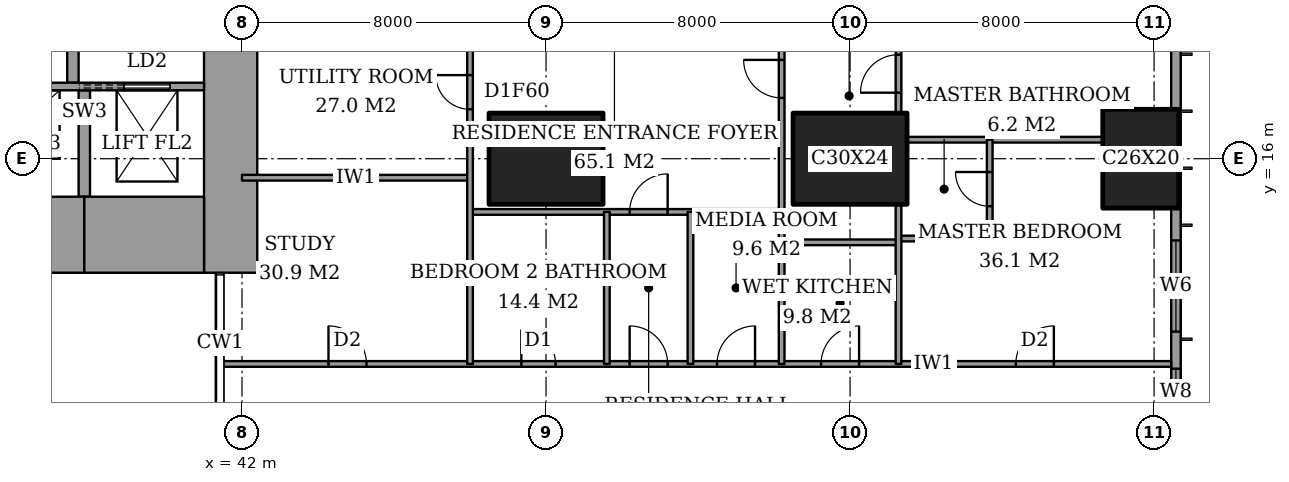
"""IFC4 building model, lengths in metres.
Left out: names, types, materials, properties, quantities, classifications, styles, units other than length and angle.
Written with IfcOpenShell. Run it as: python <this file> out.ifc"""

import sys

from ifc_helpers import new_model, si_unit, direction, frame, frame_2d, origin, origin_2d, place, context, subcontext, project, spatial, rectangle, extrude, element, fill, save


model = new_model("IFC4")
c1 = context("Model", 3, precision=1e-05, world=origin(), true_north=direction((0.0, 1.0)))
c2 = subcontext(c1, "Body", "Model", "MODEL_VIEW")
j1 = project(units=[si_unit("LENGTHUNIT", "METRE"), si_unit("PLANEANGLEUNIT", "RADIAN")], contexts=[c1])
p1 = place(None, origin())
s1 = spatial("IfcSite", under=j1, at=p1, CompositionType="ELEMENT")
p2 = place(p1, origin())
s2 = spatial("IfcBuilding", under=s1, at=p2, CompositionType="ELEMENT")
p3 = place(p2, frame((0.0, 0.0, 44.0)))
s3 = spatial("IfcBuildingStorey", under=s2, at=p3, CompositionType="ELEMENT", Elevation=44.0)
for number, where, z_axis, x_axis in (
    (1, (50.0, 16.0, 0.0), (0.0, 0.0, 1.0), (1.0, 0.0, 0.0)),
    (2, (58.0, 16.0, 0.0), (0.0, 0.0, 1.0), (1.0, 0.0, 0.0)),
):
    element("IfcColumn", number, at=place(p3, frame(where, z_axis=z_axis, x_axis=x_axis)), inside=s3, PredefinedType="COLUMN", context=c2, shape_type="SweptSolid", body=[
        extrude(rectangle(XDim=3.0, YDim=2.4, at=origin_2d()), origin(), (0.0, 0.0, 1.0), 3.6),
    ])
p4 = place(p3, frame((65.65, 16.0, 0.0), z_axis=(0.0, 0.0, 1.0), x_axis=(0.0, 1.0, 0.0)))
e3 = element("IfcColumn", 3, at=p4, inside=s3, PredefinedType="COLUMN", context=c2, shape_type="SweptSolid", body=[
    extrude(rectangle(XDim=2.6, YDim=2.0, at=origin_2d()), origin(), (0.0, 0.0, 1.0), 3.6),
])
p5 = place(p3, frame((28.15, 14.0, 0.0), z_axis=(0.0, 0.0, 1.0), x_axis=(1.0, 0.0, 0.0)))
e4 = element("IfcWall", 4, at=p5, inside=s3, PredefinedType="SHEAR", context=c2, shape_type="SweptSolid", body=[
    extrude(rectangle(XDim=9.7, YDim=2.0, at=frame_2d((4.85, 0.0))), origin(), (0.0, 0.0, 1.0), 3.6),
])
p6 = place(p3, frame((37.85, 14.0, 0.0), z_axis=(0.0, 0.0, 1.0), x_axis=(1.0, 0.0, 0.0)))
e5 = element("IfcWall", 5, at=p6, inside=s3, PredefinedType="SHEAR", context=c2, shape_type="SweptSolid", body=[
    extrude(rectangle(XDim=3.15, YDim=2.0, at=frame_2d((1.575, 0.0))), origin(), (0.0, 0.0, 1.0), 3.6),
])
p7 = place(p3, frame((41.7, 13.0, 0.0), z_axis=(0.0, 0.0, 1.0), x_axis=(0.0, 1.0, 0.0)))
e6 = element("IfcWall", 6, at=p7, inside=s3, PredefinedType="SHEAR", context=c2, shape_type="SweptSolid", body=[
    extrude(rectangle(XDim=11.85, YDim=1.4, at=frame_2d((5.925, 0.0))), origin(), (0.0, 0.0, 1.0), 3.6),
])
p8 = place(p7, frame((7.5, 0.0, 0.0)))
e7 = element("IfcOpeningElement", 7, at=p8, cuts=e6, PredefinedType="OPENING", context=c2, shape_type="SweptSolid", body=[
    extrude(rectangle(XDim=1.8, YDim=2.4, at=frame_2d((0.9, 1.2))), frame((0.0, 0.71, 0.0), z_axis=(0.0, -1.0, 0.0), x_axis=(1.0, 0.0, 0.0)), (0.0, 0.0, 1.0), 1.42),
])
p9 = place(p3, frame((37.55, 18.0, 0.0), z_axis=(0.0, 0.0, 1.0), x_axis=(0.0, 1.0, 0.0)))
e8 = element("IfcWall", 8, at=p9, inside=s3, PredefinedType="PARTITIONING", context=c2, shape_type="SweptSolid", body=[
    extrude(rectangle(XDim=6.7, YDim=0.3, at=frame_2d((3.35, 0.0))), origin(), (0.0, 0.0, 1.0), 3.6),
])
p10 = place(p9, frame((2.8, 0.0, 0.0)))
e9 = element("IfcOpeningElement", 9, at=p10, cuts=e8, PredefinedType="OPENING", context=c2, shape_type="SweptSolid", body=[
    extrude(rectangle(XDim=1.2, YDim=2.1, at=frame_2d((0.6, 1.05))), frame((0.0, 0.16, 0.0), z_axis=(0.0, -1.0, 0.0), x_axis=(1.0, 0.0, 0.0)), (0.0, 0.0, 1.0), 0.32),
])
p11 = place(p3, frame((66.575, 3.175, 0.0), z_axis=(0.0, 0.0, 1.0), x_axis=(0.0, 1.0, 0.0)))
e10 = element("IfcWall", 10, at=p11, inside=s3, PredefinedType="SOLIDWALL", context=c2, shape_type="SweptSolid", body=[
    extrude(rectangle(XDim=41.65, YDim=0.25, at=frame_2d((20.825, 0.0))), origin(), (0.0, 0.0, 1.0), 3.6),
])
p12 = place(p11, frame((0.775, 0.0, 0.6)))
e11 = element("IfcOpeningElement", 11, at=p12, cuts=e10, PredefinedType="OPENING", context=c2, shape_type="SweptSolid", body=[
    extrude(rectangle(XDim=2.4, YDim=2.0, at=frame_2d((1.2, 1.0))), frame((0.0, 0.135, 0.0), z_axis=(0.0, -1.0, 0.0), x_axis=(1.0, 0.0, 0.0)), (0.0, 0.0, 1.0), 0.27),
])
p13 = place(p11, frame((6.1, 0.0, 0.6)))
e12 = element("IfcOpeningElement", 12, at=p13, cuts=e10, PredefinedType="OPENING", context=c2, shape_type="SweptSolid", body=[
    extrude(rectangle(XDim=1.2, YDim=2.0, at=frame_2d((0.6, 1.0))), frame((0.0, 0.135, 0.0), z_axis=(0.0, -1.0, 0.0), x_axis=(1.0, 0.0, 0.0)), (0.0, 0.0, 1.0), 0.27),
])
p14 = place(p11, frame((8.275, 0.0, 0.6)))
e13 = element("IfcOpeningElement", 13, at=p14, cuts=e10, PredefinedType="OPENING", context=c2, shape_type="SweptSolid", body=[
    extrude(rectangle(XDim=2.4, YDim=2.0, at=frame_2d((1.2, 1.0))), frame((0.0, 0.135, 0.0), z_axis=(0.0, -1.0, 0.0), x_axis=(1.0, 0.0, 0.0)), (0.0, 0.0, 1.0), 0.27),
])
p15 = place(p11, frame((15.775, 0.0, 0.6)))
e14 = element("IfcOpeningElement", 14, at=p15, cuts=e10, PredefinedType="OPENING", context=c2, shape_type="SweptSolid", body=[
    extrude(rectangle(XDim=2.4, YDim=2.0, at=frame_2d((1.2, 1.0))), frame((0.0, 0.135, 0.0), z_axis=(0.0, -1.0, 0.0), x_axis=(1.0, 0.0, 0.0)), (0.0, 0.0, 1.0), 0.27),
])
p16 = place(p11, frame((23.475, 0.0, 0.6)))
e15 = element("IfcOpeningElement", 15, at=p16, cuts=e10, PredefinedType="OPENING", context=c2, shape_type="SweptSolid", body=[
    extrude(rectangle(XDim=2.4, YDim=2.0, at=frame_2d((1.2, 1.0))), frame((0.0, 0.135, 0.0), z_axis=(0.0, -1.0, 0.0), x_axis=(1.0, 0.0, 0.0)), (0.0, 0.0, 1.0), 0.27),
])
p17 = place(p11, frame((30.975, 0.0, 0.6)))
e16 = element("IfcOpeningElement", 16, at=p17, cuts=e10, PredefinedType="OPENING", context=c2, shape_type="SweptSolid", body=[
    extrude(rectangle(XDim=2.4, YDim=2.0, at=frame_2d((1.2, 1.0))), frame((0.0, 0.135, 0.0), z_axis=(0.0, -1.0, 0.0), x_axis=(1.0, 0.0, 0.0)), (0.0, 0.0, 1.0), 0.27),
])
p18 = place(p11, frame((34.5, 0.0, 0.6)))
e17 = element("IfcOpeningElement", 17, at=p18, cuts=e10, PredefinedType="OPENING", context=c2, shape_type="SweptSolid", body=[
    extrude(rectangle(XDim=1.2, YDim=2.0, at=frame_2d((0.6, 1.0))), frame((0.0, 0.135, 0.0), z_axis=(0.0, -1.0, 0.0), x_axis=(1.0, 0.0, 0.0)), (0.0, 0.0, 1.0), 0.27),
])
p19 = place(p11, frame((38.475, 0.0, 0.6)))
e18 = element("IfcOpeningElement", 18, at=p19, cuts=e10, PredefinedType="OPENING", context=c2, shape_type="SweptSolid", body=[
    extrude(rectangle(XDim=2.4, YDim=2.0, at=frame_2d((1.2, 1.0))), frame((0.0, 0.135, 0.0), z_axis=(0.0, -1.0, 0.0), x_axis=(1.0, 0.0, 0.0)), (0.0, 0.0, 1.0), 0.27),
])
p20 = place(p3, frame((41.439, 10.6, 0.0), z_axis=(0.0, 0.0, 1.0), x_axis=(1.0, 0.0, 0.0)))
e19 = element("IfcWall", 19, at=p20, inside=s3, PredefinedType="PARTITIONING", context=c2, shape_type="SweptSolid", body=[
    extrude(rectangle(XDim=25.011, YDim=0.15, at=frame_2d((12.505, 0.0))), origin(), (0.0, 0.0, 1.0), 3.35),
])
p21 = place(p20, frame((10.761, 0.0, 0.0)))
e20 = element("IfcOpeningElement", 20, at=p21, cuts=e19, PredefinedType="OPENING", context=c2, shape_type="SweptSolid", body=[
    extrude(rectangle(XDim=1.0, YDim=2.1, at=frame_2d((0.5, 1.05))), frame((0.0, 0.085, 0.0), z_axis=(0.0, -1.0, 0.0), x_axis=(1.0, 0.0, 0.0)), (0.0, 0.0, 1.0), 0.17),
])
p22 = place(p20, frame((20.924, 0.0, 0.0)))
e21 = element("IfcOpeningElement", 21, at=p22, cuts=e19, PredefinedType="OPENING", context=c2, shape_type="SweptSolid", body=[
    extrude(rectangle(XDim=1.0, YDim=2.1, at=frame_2d((0.5, 1.05))), frame((0.0, 0.085, 0.0), z_axis=(0.0, -1.0, 0.0), x_axis=(1.0, 0.0, 0.0)), (0.0, 0.0, 1.0), 0.17),
])
p23 = place(p20, frame((15.799, 0.0, 0.0)))
e22 = element("IfcOpeningElement", 22, at=p23, cuts=e19, PredefinedType="OPENING", context=c2, shape_type="SweptSolid", body=[
    extrude(rectangle(XDim=1.0, YDim=2.1, at=frame_2d((0.5, 1.05))), frame((0.0, 0.085, 0.0), z_axis=(0.0, -1.0, 0.0), x_axis=(1.0, 0.0, 0.0)), (0.0, 0.0, 1.0), 0.17),
])
p24 = place(p20, frame((13.061, 0.0, 0.0)))
e23 = element("IfcOpeningElement", 23, at=p24, cuts=e19, PredefinedType="OPENING", context=c2, shape_type="SweptSolid", body=[
    extrude(rectangle(XDim=1.0, YDim=2.1, at=frame_2d((0.5, 1.05))), frame((0.0, 0.085, 0.0), z_axis=(0.0, -1.0, 0.0), x_axis=(1.0, 0.0, 0.0)), (0.0, 0.0, 1.0), 0.17),
])
p25 = place(p20, frame((7.911, 0.0, 0.0)))
e24 = element("IfcOpeningElement", 24, at=p25, cuts=e19, PredefinedType="OPENING", context=c2, shape_type="SweptSolid", body=[
    extrude(rectangle(XDim=0.9, YDim=2.1, at=frame_2d((0.45, 1.05))), frame((0.0, 0.085, 0.0), z_axis=(0.0, -1.0, 0.0), x_axis=(1.0, 0.0, 0.0)), (0.0, 0.0, 1.0), 0.17),
])
p26 = place(p20, frame((2.836, 0.0, 0.0)))
e25 = element("IfcOpeningElement", 25, at=p26, cuts=e19, PredefinedType="OPENING", context=c2, shape_type="SweptSolid", body=[
    extrude(rectangle(XDim=1.0, YDim=2.1, at=frame_2d((0.5, 1.05))), frame((0.0, 0.085, 0.0), z_axis=(0.0, -1.0, 0.0), x_axis=(1.0, 0.0, 0.0)), (0.0, 0.0, 1.0), 0.17),
])
p27 = place(p3, frame((56.2, 13.8, 0.0), z_axis=(0.0, 0.0, 1.0), x_axis=(1.0, 0.0, 0.0)))
e26 = element("IfcWall", 26, at=p27, inside=s3, PredefinedType="PARTITIONING", context=c2, shape_type="SweptSolid", body=[
    extrude(rectangle(XDim=3.075, YDim=0.15, at=frame_2d((1.538, 0.0))), origin(), (0.0, 0.0, 1.0), 3.35),
])
p28 = place(p3, frame((59.275, 13.9, 0.0), z_axis=(0.0, 0.0, 1.0), x_axis=(1.0, 0.0, 0.0)))
e27 = element("IfcWall", 27, at=p28, inside=s3, PredefinedType="PARTITIONING", context=c2, shape_type="SweptSolid", body=[
    extrude(rectangle(XDim=2.4, YDim=0.15, at=frame_2d((1.2, 0.0))), origin(), (0.0, 0.0, 1.0), 3.35),
])
p29 = place(p3, frame((48.0, 14.6, 0.0), z_axis=(0.0, 0.0, 1.0), x_axis=(1.0, 0.0, 0.0)))
e28 = element("IfcWall", 28, at=p29, inside=s3, PredefinedType="PARTITIONING", context=c2, shape_type="SweptSolid", body=[
    extrude(rectangle(XDim=8.2, YDim=0.15, at=frame_2d((4.1, 0.0))), origin(), (0.0, 0.0, 1.0), 3.35),
])
p30 = place(p29, frame((4.2, 0.0, 0.0)))
e29 = element("IfcOpeningElement", 29, at=p30, cuts=e28, PredefinedType="OPENING", context=c2, shape_type="SweptSolid", body=[
    extrude(rectangle(XDim=1.0, YDim=2.1, at=frame_2d((0.5, 1.05))), frame((0.0, 0.085, 0.0), z_axis=(0.0, -1.0, 0.0), x_axis=(1.0, 0.0, 0.0)), (0.0, 0.0, 1.0), 0.17),
])
p31 = place(p3, frame((42.0, 15.5, 0.0), z_axis=(0.0, 0.0, 1.0), x_axis=(1.0, 0.0, 0.0)))
e30 = element("IfcWall", 30, at=p31, inside=s3, PredefinedType="PARTITIONING", context=c2, shape_type="SweptSolid", body=[
    extrude(rectangle(XDim=6.0, YDim=0.15, at=frame_2d((3.0, 0.0))), origin(), (0.0, 0.0, 1.0), 3.35),
])
p32 = place(p3, frame((59.5, 16.5, 0.0), z_axis=(0.0, 0.0, 1.0), x_axis=(1.0, 0.0, 0.0)))
e31 = element("IfcWall", 31, at=p32, inside=s3, PredefinedType="PARTITIONING", context=c2, shape_type="SweptSolid", body=[
    extrude(rectangle(XDim=5.15, YDim=0.15, at=frame_2d((2.575, 0.0))), origin(), (0.0, 0.0, 1.0), 3.35),
])
p33 = place(p3, frame((48.0, 10.6, 0.0), z_axis=(0.0, 0.0, 1.0), x_axis=(0.0, 1.0, 0.0)))
e32 = element("IfcWall", 32, at=p33, inside=s3, PredefinedType="PARTITIONING", context=c2, shape_type="SweptSolid", body=[
    extrude(rectangle(XDim=13.4, YDim=0.15, at=frame_2d((6.7, 0.0))), origin(), (0.0, 0.0, 1.0), 3.35),
])
p34 = place(p33, frame((10.8, 0.0, 0.0)))
e33 = element("IfcOpeningElement", 33, at=p34, cuts=e32, PredefinedType="OPENING", context=c2, shape_type="SweptSolid", body=[
    extrude(rectangle(XDim=1.2, YDim=2.4, at=frame_2d((0.6, 1.2))), frame((0.0, 0.085, 0.0), z_axis=(0.0, -1.0, 0.0), x_axis=(1.0, 0.0, 0.0)), (0.0, 0.0, 1.0), 0.17),
])
p35 = place(p33, frame((6.7, 0.0, 0.0)))
e34 = element("IfcOpeningElement", 34, at=p35, cuts=e32, PredefinedType="OPENING", context=c2, shape_type="SweptSolid", body=[
    extrude(rectangle(XDim=0.9, YDim=2.1, at=frame_2d((0.45, 1.05))), frame((0.0, 0.085, 0.0), z_axis=(0.0, -1.0, 0.0), x_axis=(1.0, 0.0, 0.0)), (0.0, 0.0, 1.0), 0.17),
])
for number, where, z_axis, x_axis in (
    (35, (51.6, 10.6, 0.0), (0.0, 0.0, 1.0), (0.0, 1.0, 0.0)),
    (36, (53.8, 10.6, 0.0), (0.0, 0.0, 1.0), (0.0, 1.0, 0.0)),
):
    element("IfcWall", number, at=place(p3, frame(where, z_axis=z_axis, x_axis=x_axis)), inside=s3, PredefinedType="PARTITIONING", context=c2, shape_type="SweptSolid", body=[
        extrude(rectangle(XDim=4.0, YDim=0.15, at=frame_2d((2.0, 0.0))), origin(), (0.0, 0.0, 1.0), 3.35),
    ])
p36 = place(p3, frame((56.2, 10.6, 0.0), z_axis=(0.0, 0.0, 1.0), x_axis=(0.0, 1.0, 0.0)))
e37 = element("IfcWall", 37, at=p36, inside=s3, PredefinedType="PARTITIONING", context=c2, shape_type="SweptSolid", body=[
    extrude(rectangle(XDim=11.0, YDim=0.15, at=frame_2d((5.5, 0.0))), origin(), (0.0, 0.0, 1.0), 3.35),
])
p37 = place(p36, frame((7.0, 0.0, 0.0)))
e38 = element("IfcOpeningElement", 38, at=p37, cuts=e37, PredefinedType="OPENING", context=c2, shape_type="SweptSolid", body=[
    extrude(rectangle(XDim=1.0, YDim=2.1, at=frame_2d((0.5, 1.05))), frame((0.0, 0.085, 0.0), z_axis=(0.0, -1.0, 0.0), x_axis=(1.0, 0.0, 0.0)), (0.0, 0.0, 1.0), 0.17),
])
p38 = place(p3, frame((59.275, 10.6, 0.0), z_axis=(0.0, 0.0, 1.0), x_axis=(0.0, 1.0, 0.0)))
e39 = element("IfcWall", 39, at=p38, inside=s3, PredefinedType="PARTITIONING", context=c2, shape_type="SweptSolid", body=[
    extrude(rectangle(XDim=4.2, YDim=0.15, at=frame_2d((2.1, 0.0))), origin(), (0.0, 0.0, 1.0), 3.35),
])
p39 = place(p3, frame((59.275, 17.2, 0.0), z_axis=(0.0, 0.0, 1.0), x_axis=(0.0, 1.0, 0.0)))
e40 = element("IfcWall", 40, at=p39, inside=s3, PredefinedType="PARTITIONING", context=c2, shape_type="SweptSolid", body=[
    extrude(rectangle(XDim=2.45, YDim=0.15, at=frame_2d((1.225, 0.0))), origin(), (0.0, 0.0, 1.0), 3.35),
])
p40 = place(p39, frame((0.538, 0.0, 0.0)))
e41 = element("IfcOpeningElement", 41, at=p40, cuts=e40, PredefinedType="OPENING", context=c2, shape_type="SweptSolid", body=[
    extrude(rectangle(XDim=1.0, YDim=2.1, at=frame_2d((0.5, 1.05))), frame((0.0, 0.085, 0.0), z_axis=(0.0, -1.0, 0.0), x_axis=(1.0, 0.0, 0.0)), (0.0, 0.0, 1.0), 0.17),
])
p41 = place(p3, frame((61.675, 13.9, 0.0), z_axis=(0.0, 0.0, 1.0), x_axis=(0.0, 1.0, 0.0)))
e42 = element("IfcWall", 42, at=p41, inside=s3, PredefinedType="PARTITIONING", context=c2, shape_type="SweptSolid", body=[
    extrude(rectangle(XDim=2.6, YDim=0.15, at=frame_2d((1.3, 0.0))), origin(), (0.0, 0.0, 1.0), 3.35),
])
p42 = place(p41, frame((0.85, 0.0, 0.0)))
e43 = element("IfcOpeningElement", 43, at=p42, cuts=e42, PredefinedType="OPENING", context=c2, shape_type="SweptSolid", body=[
    extrude(rectangle(XDim=0.9, YDim=2.1, at=frame_2d((0.45, 1.05))), frame((0.0, 0.085, 0.0), z_axis=(0.0, -1.0, 0.0), x_axis=(1.0, 0.0, 0.0)), (0.0, 0.0, 1.0), 0.17),
])
p43 = place(p3, frame((28.3, 17.9, 0.0), z_axis=(0.0, 0.0, 1.0), x_axis=(1.0, 0.0, 0.0)))
e44 = element("IfcWall", 44, at=p43, inside=s3, PredefinedType="PARTITIONING", context=c2, shape_type="SweptSolid", body=[
    extrude(rectangle(XDim=12.7, YDim=0.2, at=frame_2d((6.35, 0.0))), origin(), (0.0, 0.0, 1.0), 3.6),
])
p44 = place(p43, frame((0.95, 0.0, 0.0)))
e45 = element("IfcOpeningElement", 45, at=p44, cuts=e44, PredefinedType="OPENING", context=c2, shape_type="SweptSolid", body=[
    extrude(rectangle(XDim=1.1, YDim=2.1, at=frame_2d((0.55, 1.05))), frame((0.0, 0.11, 0.0), z_axis=(0.0, -1.0, 0.0), x_axis=(1.0, 0.0, 0.0)), (0.0, 0.0, 1.0), 0.22),
])
p45 = place(p43, frame((4.15, 0.0, 0.0)))
e46 = element("IfcOpeningElement", 46, at=p45, cuts=e44, PredefinedType="OPENING", context=c2, shape_type="SweptSolid", body=[
    extrude(rectangle(XDim=1.1, YDim=2.1, at=frame_2d((0.55, 1.05))), frame((0.0, 0.11, 0.0), z_axis=(0.0, -1.0, 0.0), x_axis=(1.0, 0.0, 0.0)), (0.0, 0.0, 1.0), 0.22),
])
p46 = place(p43, frame((7.35, 0.0, 0.0)))
e47 = element("IfcOpeningElement", 47, at=p46, cuts=e44, PredefinedType="OPENING", context=c2, shape_type="SweptSolid", body=[
    extrude(rectangle(XDim=1.1, YDim=2.1, at=frame_2d((0.55, 1.05))), frame((0.0, 0.11, 0.0), z_axis=(0.0, -1.0, 0.0), x_axis=(1.0, 0.0, 0.0)), (0.0, 0.0, 1.0), 0.22),
])
p47 = place(p43, frame((10.6, 0.0, 0.0)))
e48 = element("IfcOpeningElement", 48, at=p47, cuts=e44, PredefinedType="OPENING", context=c2, shape_type="SweptSolid", body=[
    extrude(rectangle(XDim=1.2, YDim=2.1, at=frame_2d((0.6, 1.05))), frame((0.0, 0.11, 0.0), z_axis=(0.0, -1.0, 0.0), x_axis=(1.0, 0.0, 0.0)), (0.0, 0.0, 1.0), 0.22),
])
p48 = place(p3, frame((37.85, 15.0, 0.0), z_axis=(0.0, 0.0, 1.0), x_axis=(0.0, 1.0, 0.0)))
e49 = element("IfcWall", 49, at=p48, inside=s3, PredefinedType="SHEAR", context=c2, shape_type="SweptSolid", body=[
    extrude(rectangle(XDim=2.8, YDim=0.3, at=frame_2d((1.4, 0.0))), origin(), (0.0, 0.0, 1.0), 3.6),
])
p49 = place(p13, origin())
e50 = element("IfcWindow", 50, at=p49, inside=s3, PartitioningType="SINGLE_PANEL", PredefinedType="WINDOW", context=c2, shape_type="SweptSolid", body=[
    extrude(rectangle(XDim=1.2, YDim=2.0, at=frame_2d((0.6, 1.0))), frame((0.0, 0.03, 0.0), z_axis=(0.0, -1.0, 0.0), x_axis=(1.0, 0.0, 0.0)), (0.0, 0.0, 1.0), 0.06),
])
fill(e12, e50)
p50 = place(p14, origin())
e51 = element("IfcWindow", 51, at=p50, inside=s3, PartitioningType="SINGLE_PANEL", PredefinedType="WINDOW", context=c2, shape_type="SweptSolid", body=[
    extrude(rectangle(XDim=2.4, YDim=2.0, at=frame_2d((1.2, 1.0))), frame((0.0, 0.03, 0.0), z_axis=(0.0, -1.0, 0.0), x_axis=(1.0, 0.0, 0.0)), (0.0, 0.0, 1.0), 0.06),
])
fill(e13, e51)
p51 = place(p21, origin())
e52 = element("IfcDoor", 52, at=p51, inside=s3, OperationType="SINGLE_SWING_RIGHT", PredefinedType="DOOR", context=c2, shape_type="SweptSolid", body=[
    extrude(rectangle(XDim=1.0, YDim=2.1, at=frame_2d((0.5, 1.05))), frame((0.0, 0.025, 0.0), z_axis=(0.0, -1.0, 0.0), x_axis=(1.0, 0.0, 0.0)), (0.0, 0.0, 1.0), 0.05),
])
fill(e20, e52)
p52 = place(p42, origin())
e53 = element("IfcDoor", 53, at=p52, inside=s3, OperationType="SINGLE_SWING_LEFT", PredefinedType="DOOR", context=c2, shape_type="SweptSolid", body=[
    extrude(rectangle(XDim=0.9, YDim=2.1, at=frame_2d((0.45, 1.05))), frame((0.0, 0.025, 0.0), z_axis=(0.0, -1.0, 0.0), x_axis=(1.0, 0.0, 0.0)), (0.0, 0.0, 1.0), 0.05),
])
fill(e43, e53)
p53 = place(p22, origin())
e54 = element("IfcDoor", 54, at=p53, inside=s3, OperationType="SINGLE_SWING_LEFT", PredefinedType="DOOR", context=c2, shape_type="SweptSolid", body=[
    extrude(rectangle(XDim=1.0, YDim=2.1, at=frame_2d((0.5, 1.05))), frame((0.0, 0.025, 0.0), z_axis=(0.0, -1.0, 0.0), x_axis=(1.0, 0.0, 0.0)), (0.0, 0.0, 1.0), 0.05),
])
fill(e21, e54)
p54 = place(p40, origin())
e55 = element("IfcDoor", 55, at=p54, inside=s3, OperationType="SINGLE_SWING_RIGHT", PredefinedType="DOOR", context=c2, shape_type="SweptSolid", body=[
    extrude(rectangle(XDim=1.0, YDim=2.1, at=frame_2d((0.5, 1.05))), frame((0.0, 0.025, 0.0), z_axis=(0.0, -1.0, 0.0), x_axis=(1.0, 0.0, 0.0)), (0.0, 0.0, 1.0), 0.05),
])
fill(e41, e55)
p55 = place(p23, origin())
e56 = element("IfcDoor", 56, at=p55, inside=s3, OperationType="SINGLE_SWING_LEFT", PredefinedType="DOOR", context=c2, shape_type="SweptSolid", body=[
    extrude(rectangle(XDim=1.0, YDim=2.1, at=frame_2d((0.5, 1.05))), frame((0.0, 0.025, 0.0), z_axis=(0.0, -1.0, 0.0), x_axis=(1.0, 0.0, 0.0)), (0.0, 0.0, 1.0), 0.05),
])
fill(e22, e56)
p56 = place(p37, origin())
e57 = element("IfcDoor", 57, at=p56, inside=s3, OperationType="SINGLE_SWING_LEFT", PredefinedType="DOOR", context=c2, shape_type="SweptSolid", body=[
    extrude(rectangle(XDim=1.0, YDim=2.1, at=frame_2d((0.5, 1.05))), frame((0.0, 0.025, 0.0), z_axis=(0.0, -1.0, 0.0), x_axis=(1.0, 0.0, 0.0)), (0.0, 0.0, 1.0), 0.05),
])
fill(e38, e57)
p57 = place(p24, origin())
e58 = element("IfcDoor", 58, at=p57, inside=s3, OperationType="SINGLE_SWING_LEFT", PredefinedType="DOOR", context=c2, shape_type="SweptSolid", body=[
    extrude(rectangle(XDim=1.0, YDim=2.1, at=frame_2d((0.5, 1.05))), frame((0.0, 0.025, 0.0), z_axis=(0.0, -1.0, 0.0), x_axis=(1.0, 0.0, 0.0)), (0.0, 0.0, 1.0), 0.05),
])
fill(e23, e58)
p58 = place(p30, origin())
e59 = element("IfcDoor", 59, at=p58, inside=s3, OperationType="SINGLE_SWING_LEFT", PredefinedType="DOOR", context=c2, shape_type="SweptSolid", body=[
    extrude(rectangle(XDim=1.0, YDim=2.1, at=frame_2d((0.5, 1.05))), frame((0.0, 0.025, 0.0), z_axis=(0.0, -1.0, 0.0), x_axis=(1.0, 0.0, 0.0)), (0.0, 0.0, 1.0), 0.05),
])
fill(e29, e59)
p59 = place(p25, origin())
e60 = element("IfcDoor", 60, at=p59, inside=s3, OperationType="SINGLE_SWING_RIGHT", PredefinedType="DOOR", context=c2, shape_type="SweptSolid", body=[
    extrude(rectangle(XDim=0.9, YDim=2.1, at=frame_2d((0.45, 1.05))), frame((0.0, 0.025, 0.0), z_axis=(0.0, -1.0, 0.0), x_axis=(1.0, 0.0, 0.0)), (0.0, 0.0, 1.0), 0.05),
])
fill(e24, e60)
p60 = place(p26, origin())
e61 = element("IfcDoor", 61, at=p60, inside=s3, OperationType="SINGLE_SWING_RIGHT", PredefinedType="DOOR", context=c2, shape_type="SweptSolid", body=[
    extrude(rectangle(XDim=1.0, YDim=2.1, at=frame_2d((0.5, 1.05))), frame((0.0, 0.025, 0.0), z_axis=(0.0, -1.0, 0.0), x_axis=(1.0, 0.0, 0.0)), (0.0, 0.0, 1.0), 0.05),
])
fill(e25, e61)
p61 = place(p35, origin())
e62 = element("IfcDoor", 62, at=p61, inside=s3, OperationType="SINGLE_SWING_LEFT", PredefinedType="DOOR", context=c2, shape_type="SweptSolid", body=[
    extrude(rectangle(XDim=0.9, YDim=2.1, at=frame_2d((0.45, 1.05))), frame((0.0, 0.025, 0.0), z_axis=(0.0, -1.0, 0.0), x_axis=(1.0, 0.0, 0.0)), (0.0, 0.0, 1.0), 0.05),
])
fill(e34, e62)
p62 = place(p47, origin())
e63 = element("IfcDoor", 63, at=p62, inside=s3, OperationType="SLIDING_TO_LEFT", PredefinedType="DOOR", context=c2, shape_type="SweptSolid", body=[
    extrude(rectangle(XDim=1.2, YDim=2.1, at=frame_2d((0.6, 1.05))), frame((0.0, 0.025, 0.0), z_axis=(0.0, -1.0, 0.0), x_axis=(1.0, 0.0, 0.0)), (0.0, 0.0, 1.0), 0.05),
])
fill(e48, e63)
save(model, sys.argv[1])
